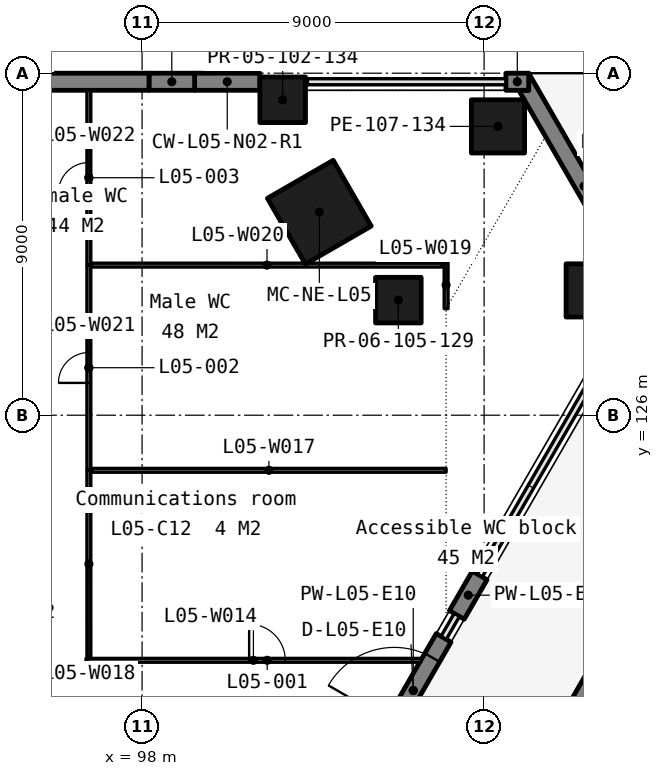
"""IFC4 building model, lengths in metres.
Left out: names, types, materials, properties, quantities, classifications, styles, units other than length and angle.
Written with IfcOpenShell. Run it as: python <this file> out.ifc"""

import sys

from ifc_helpers import new_model, si_unit, direction, frame, frame_2d, origin, origin_2d, place, context, subcontext, project, spatial, polyline, rectangle, outline, extrude, element, fill, save


model = new_model("IFC4")
c1 = context("Model", 3, precision=1e-05, world=origin(), true_north=direction((0.0, 1.0)))
c2 = subcontext(c1, "Body", "Model", "MODEL_VIEW")
j1 = project(units=[si_unit("LENGTHUNIT", "METRE"), si_unit("PLANEANGLEUNIT", "RADIAN")], contexts=[c1])
p1 = place(None, origin())
s1 = spatial("IfcSite", under=j1, at=p1, CompositionType="ELEMENT")
p2 = place(p1, origin())
s2 = spatial("IfcBuilding", under=s1, at=p2, CompositionType="ELEMENT")
p3 = place(p2, frame((0.0, 0.0, 30.0)))
s3 = spatial("IfcBuildingStorey", under=s2, at=p3, CompositionType="ELEMENT", Elevation=30.0)
for number, where, z_axis, x_axis in (
    (1, (107.365, 133.6, 0.0), (0.0, 0.0, 1.0), (1.0, 0.0, 0.0)),
    (2, (109.857, 129.284, 0.0), (0.0, 0.0, 1.0), (1.0, 0.0, 0.0)),
):
    element("IfcColumn", number, at=place(p3, frame(where, z_axis=z_axis, x_axis=x_axis)), inside=s3, PredefinedType="COLUMN", context=c2, shape_type="SweptSolid", body=[
        extrude(rectangle(XDim=1.4, YDim=1.4, at=origin_2d()), origin(), (0.0, 0.0, 1.0), 5.0),
    ])
for number, where, z_axis, x_axis in (
    (3, (101.7, 134.3, 0.0), (0.0, 0.0, 1.0), (1.0, 0.0, 0.0)),
    (4, (104.744, 129.028, 0.0), (0.0, 0.0, 1.0), (1.0, 0.0, 0.0)),
):
    element("IfcColumn", number, at=place(p3, frame(where, z_axis=z_axis, x_axis=x_axis)), inside=s3, PredefinedType="COLUMN", context=c2, shape_type="SweptSolid", body=[
        extrude(rectangle(XDim=1.2, YDim=1.2, at=origin_2d()), origin(), (0.0, 0.0, 1.0), 5.0),
    ])
p4 = place(p3, frame((102.664, 131.342, 0.0), z_axis=(0.0, 0.0, 1.0), x_axis=(-0.5, 0.866025403784, 0.0)))
e5 = element("IfcColumn", 5, at=p4, inside=s3, PredefinedType="COLUMN", context=c2, shape_type="SweptSolid", body=[
    extrude(rectangle(XDim=2.0, YDim=2.0, at=origin_2d()), origin(), (0.0, 0.0, 1.0), 5.0),
])
p5 = place(p3, frame((0.0, 0.0, -0.3)))
e6 = element("IfcWall", 6, at=p5, inside=s3, PredefinedType="SOLIDWALL", context=c2, shape_type="SweptSolid", body=[
    extrude(outline(polyline([(111.473, 129.284), (111.084, 129.509), (110.954, 129.284), (107.914, 134.55), (108.174, 134.55), (108.174, 135.0), (111.473, 129.284)])), origin(), (0.0, 0.0, 1.0), 4.413),
])
p6 = place(p3, frame((108.174, 134.775, -0.3), z_axis=(0.0, 0.0, 1.0), x_axis=(-1.0, 0.0, 0.0)))
e7 = element("IfcWall", 7, at=p6, inside=s3, PredefinedType="SOLIDWALL", context=c2, shape_type="SweptSolid", body=[
    extrude(rectangle(XDim=0.6, YDim=0.45, at=frame_2d((0.3, 0.0))), origin(), (0.0, 0.0, 1.0), 4.413),
])
p7 = place(p3, frame((101.1, 134.775, -0.3), z_axis=(0.0, 0.0, 1.0), x_axis=(-1.0, 0.0, 0.0)))
e8 = element("IfcWall", 8, at=p7, inside=s3, PredefinedType="SOLIDWALL", context=c2, shape_type="SweptSolid", body=[
    extrude(rectangle(XDim=1.718, YDim=0.45, at=frame_2d((0.859, 0.0))), origin(), (0.0, 0.0, 1.0), 4.413),
])
p8 = place(p3, frame((99.382, 134.775, -0.3), z_axis=(0.0, 0.0, 1.0), x_axis=(-1.0, 0.0, 0.0)))
e9 = element("IfcWall", 9, at=p8, inside=s3, PredefinedType="SOLIDWALL", context=c2, shape_type="SweptSolid", body=[
    extrude(rectangle(XDim=1.2, YDim=0.45, at=frame_2d((0.6, 0.0))), origin(), (0.0, 0.0, 1.0), 4.413),
])
p9 = place(p3, frame((98.182, 134.775, -0.3), z_axis=(0.0, 0.0, 1.0), x_axis=(-1.0, 0.0, 0.0)))
e10 = element("IfcWall", 10, at=p9, inside=s3, PredefinedType="SOLIDWALL", context=c2, shape_type="SweptSolid", body=[
    extrude(rectangle(XDim=8.191, YDim=0.45, at=frame_2d((4.096, 0.0))), origin(), (0.0, 0.0, 1.0), 4.413),
])
p10 = place(p3, frame((104.335, 117.37, -0.3), z_axis=(0.0, 0.0, 1.0), x_axis=(0.499995408039, 0.866028054938, 0.0)))
e11 = element("IfcWall", 11, at=p10, inside=s3, PredefinedType="SOLIDWALL", context=c2, shape_type="SweptSolid", body=[
    extrude(rectangle(XDim=3.2, YDim=0.45, at=frame_2d((1.6, 0.0))), origin(), (0.0, 0.0, 1.0), 4.413),
])
p11 = place(p10, frame((0.6, 0.0, 0.3)))
e12 = element("IfcOpeningElement", 12, at=p11, cuts=e11, PredefinedType="OPENING", context=c2, shape_type="SweptSolid", body=[
    extrude(rectangle(XDim=2.0, YDim=2.4, at=frame_2d((1.0, 1.2))), frame((0.0, 0.235, 0.0), z_axis=(0.0, -1.0, 0.0), x_axis=(1.0, 0.0, 0.0)), (0.0, 0.0, 1.0), 0.47),
])
p12 = place(p3, frame((106.283, 120.744, -0.3), z_axis=(0.0, 0.0, 1.0), x_axis=(0.500033551112, 0.866006032174, 0.0)))
e13 = element("IfcWall", 13, at=p12, inside=s3, PredefinedType="SOLIDWALL", context=c2, shape_type="SweptSolid", body=[
    extrude(rectangle(XDim=1.2, YDim=0.45, at=frame_2d((0.6, 0.0))), origin(), (0.0, 0.0, 1.0), 4.413),
])
p13 = place(p3, frame((115.981, 129.091, 0.0), z_axis=(0.0, 0.0, 1.0), x_axis=(-0.500000858155, -0.866024908328, 0.0)))
e14 = element("IfcWall", 14, at=p13, inside=s3, PredefinedType="STANDARD", context=c2, shape_type="SweptSolid", body=[
    extrude(rectangle(XDim=66.294, YDim=1.0, at=frame_2d((33.147, 0.0))), origin(), (0.0, 0.0, 1.0), 0.6),
])
p14 = place(p3, frame((96.525, 119.55, 0.0), z_axis=(0.0, 0.0, 1.0), x_axis=(1.0, 0.0, 0.0)))
e15 = element("IfcWall", 15, at=p14, inside=s3, PredefinedType="PARTITIONING", context=c2, shape_type="SweptSolid", body=[
    extrude(rectangle(XDim=8.808, YDim=0.1, at=frame_2d((4.404, 0.0))), origin(), (0.0, 0.0, 1.0), 4.8),
])
p15 = place(p14, frame((4.292, 0.0, 0.0)))
e16 = element("IfcOpeningElement", 16, at=p15, cuts=e15, PredefinedType="OPENING", context=c2, shape_type="SweptSolid", body=[
    extrude(rectangle(XDim=0.95, YDim=2.1, at=frame_2d((0.475, 1.05))), frame((0.0, 0.06, 0.0), z_axis=(0.0, -1.0, 0.0), x_axis=(1.0, 0.0, 0.0)), (0.0, 0.0, 1.0), 0.12),
])
p16 = place(p3, frame((96.675, 124.55, 0.0), z_axis=(0.0, 0.0, 1.0), x_axis=(1.0, 0.0, 0.0)))
e17 = element("IfcWall", 17, at=p16, inside=s3, PredefinedType="PARTITIONING", context=c2, shape_type="SweptSolid", body=[
    extrude(rectangle(XDim=9.325, YDim=0.1, at=frame_2d((4.663, 0.0))), origin(), (0.0, 0.0, 1.0), 4.8),
])
p17 = place(p3, frame((96.601, 119.625, 0.0), z_axis=(0.0, 0.0, 1.0), x_axis=(-9.9142418e-05, 0.999999995085, 0.0)))
e18 = element("IfcWall", 18, at=p17, inside=s3, PredefinedType="PARTITIONING", context=c2, shape_type="SweptSolid", body=[
    extrude(rectangle(XDim=4.925, YDim=0.1, at=frame_2d((2.462, 0.0))), origin(), (0.0, 0.0, 1.0), 4.8),
])
p18 = place(p3, frame((106.0, 128.804, 0.0), z_axis=(0.0, 0.0, 1.0), x_axis=(0.0, 1.0, 0.0)))
e19 = element("IfcWall", 19, at=p18, inside=s3, PredefinedType="PARTITIONING", context=c2, shape_type="SweptSolid", body=[
    extrude(rectangle(XDim=1.246, YDim=0.1, at=frame_2d((0.623, 0.0))), origin(), (0.0, 0.0, 1.0), 4.8),
])
p19 = place(p3, frame((96.675, 129.95, 0.0), z_axis=(0.0, 0.0, 1.0), x_axis=(0.999999998599, -5.2931057e-05, 0.0)))
e20 = element("IfcWall", 20, at=p19, inside=s3, PredefinedType="PARTITIONING", context=c2, shape_type="SweptSolid", body=[
    extrude(rectangle(XDim=9.225, YDim=0.1, at=frame_2d((4.612, 0.0))), origin(), (0.0, 0.0, 1.0), 4.8),
])
p20 = place(p3, frame((96.6, 124.55, 0.0), z_axis=(0.0, 0.0, 1.0), x_axis=(0.0, 1.0, 0.0)))
e21 = element("IfcWall", 21, at=p20, inside=s3, PredefinedType="PARTITIONING", context=c2, shape_type="SweptSolid", body=[
    extrude(rectangle(XDim=5.4, YDim=0.1, at=frame_2d((2.7, 0.0))), origin(), (0.0, 0.0, 1.0), 4.8),
])
p21 = place(p20, frame((2.3, 0.0, 0.0)))
e22 = element("IfcOpeningElement", 22, at=p21, cuts=e21, PredefinedType="OPENING", context=c2, shape_type="SweptSolid", body=[
    extrude(rectangle(XDim=0.8, YDim=2.1, at=frame_2d((0.4, 1.05))), frame((0.0, 0.06, 0.0), z_axis=(0.0, -1.0, 0.0), x_axis=(1.0, 0.0, 0.0)), (0.0, 0.0, 1.0), 0.12),
])
p22 = place(p3, frame((96.6, 129.95, 0.0), z_axis=(0.0, 0.0, 1.0), x_axis=(0.0, 1.0, 0.0)))
e23 = element("IfcWall", 23, at=p22, inside=s3, PredefinedType="PARTITIONING", context=c2, shape_type="SweptSolid", body=[
    extrude(rectangle(XDim=4.6, YDim=0.1, at=frame_2d((2.3, 0.0))), origin(), (0.0, 0.0, 1.0), 4.8),
])
p23 = place(p22, frame((1.9, 0.0, 0.0)))
e24 = element("IfcOpeningElement", 24, at=p23, cuts=e23, PredefinedType="OPENING", context=c2, shape_type="SweptSolid", body=[
    extrude(rectangle(XDim=0.8, YDim=2.1, at=frame_2d((0.4, 1.05))), frame((0.0, 0.06, 0.0), z_axis=(0.0, -1.0, 0.0), x_axis=(1.0, 0.0, 0.0)), (0.0, 0.0, 1.0), 0.12),
])
p24 = place(p11, origin())
e25 = element("IfcDoor", 25, at=p24, inside=s3, OperationType="DOUBLE_DOOR_SINGLE_SWING", PredefinedType="DOOR", context=c2, shape_type="SweptSolid", body=[
    extrude(rectangle(XDim=2.0, YDim=2.4, at=frame_2d((1.0, 1.2))), frame((0.0, 0.025, 0.0), z_axis=(0.0, -1.0, 0.0), x_axis=(1.0, 0.0, 0.0)), (0.0, 0.0, 1.0), 0.05),
])
fill(e12, e25)
p25 = place(p15, origin())
e26 = element("IfcDoor", 26, at=p25, inside=s3, OperationType="SINGLE_SWING_LEFT", PredefinedType="DOOR", context=c2, shape_type="SweptSolid", body=[
    extrude(rectangle(XDim=0.95, YDim=2.1, at=frame_2d((0.475, 1.05))), frame((0.0, 0.025, 0.0), z_axis=(0.0, -1.0, 0.0), x_axis=(1.0, 0.0, 0.0)), (0.0, 0.0, 1.0), 0.05),
])
fill(e16, e26)
p26 = place(p21, origin())
e27 = element("IfcDoor", 27, at=p26, inside=s3, OperationType="SINGLE_SWING_LEFT", PredefinedType="DOOR", context=c2, shape_type="SweptSolid", body=[
    extrude(rectangle(XDim=0.8, YDim=2.1, at=frame_2d((0.4, 1.05))), frame((0.0, 0.025, 0.0), z_axis=(0.0, -1.0, 0.0), x_axis=(1.0, 0.0, 0.0)), (0.0, 0.0, 1.0), 0.05),
])
fill(e22, e27)
p27 = place(p23, origin())
e28 = element("IfcDoor", 28, at=p27, inside=s3, OperationType="SINGLE_SWING_LEFT", PredefinedType="DOOR", context=c2, shape_type="SweptSolid", body=[
    extrude(rectangle(XDim=0.8, YDim=2.1, at=frame_2d((0.4, 1.05))), frame((0.0, 0.025, 0.0), z_axis=(0.0, -1.0, 0.0), x_axis=(1.0, 0.0, 0.0)), (0.0, 0.0, 1.0), 0.05),
])
fill(e24, e28)
save(model, sys.argv[1])
